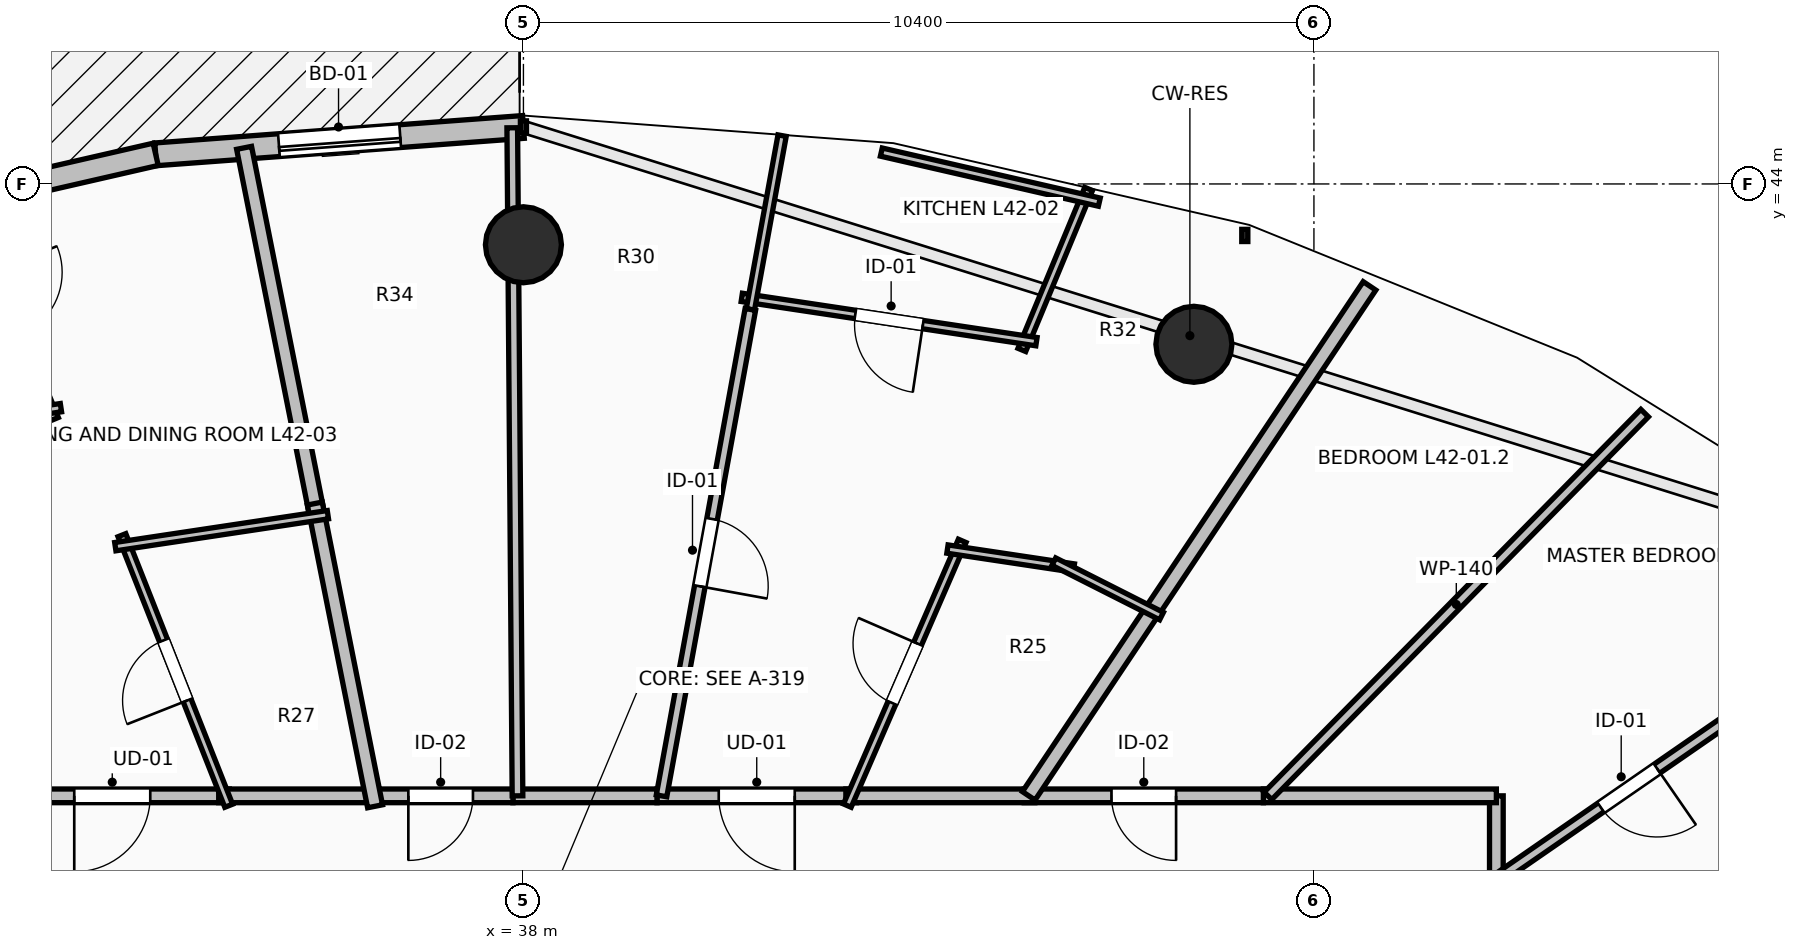
"""IFC4 building model, lengths in metres.
Left out: names, types, materials, properties, quantities, classifications, styles, units other than length and angle.
Written with IfcOpenShell. Run it as: python <this file> out.ifc"""

import sys

from ifc_helpers import new_model, si_unit, direction, frame, frame_2d, origin, origin_2d, place, context, subcontext, project, spatial, rectangle, circle, extrude, element, fill, save


model = new_model("IFC4")
c1 = context("Model", 3, precision=1e-05, world=origin(), true_north=direction((0.0, 1.0)))
c2 = subcontext(c1, "Body", "Model", "MODEL_VIEW")
j1 = project(units=[si_unit("LENGTHUNIT", "METRE"), si_unit("PLANEANGLEUNIT", "RADIAN")], contexts=[c1])
p1 = place(None, origin())
s1 = spatial("IfcSite", under=j1, at=p1, CompositionType="ELEMENT")
p2 = place(p1, origin())
s2 = spatial("IfcBuilding", under=s1, at=p2, CompositionType="ELEMENT")
p3 = place(p2, frame((0.0, 0.0, 157.1)))
s3 = spatial("IfcBuildingStorey", under=s2, at=p3, CompositionType="ELEMENT", Elevation=157.1)
for number, where, z_axis, x_axis in (
    (1, (46.821, 41.891, 0.0), (0.0, 0.0, 1.0), (0.383, 0.924, 0.0)),
    (2, (38.0, 43.2, 0.0), (0.0, 0.0, 1.0), (0.0, 1.0, 0.0)),
):
    element("IfcColumn", number, at=place(p3, frame(where, z_axis=z_axis, x_axis=x_axis)), inside=s3, PredefinedType="COLUMN", context=c2, shape_type="SweptSolid", body=[
        extrude(circle(Radius=0.5, at=origin_2d()), origin(), (0.0, 0.0, 1.0), 3.5),
    ])
p4 = place(p3, frame((38.0, 44.75, 0.0), z_axis=(0.0, 0.0, 1.0), x_axis=(-0.997237740067, -0.074275768499, 0.0)))
e3 = element("IfcWall", 3, at=p4, inside=s3, PredefinedType="STANDARD", context=c2, shape_type="SweptSolid", body=[
    extrude(rectangle(XDim=4.852, YDim=0.3, at=frame_2d((2.426, 0.0))), origin(), (0.0, 0.0, 1.0), 3.24),
])
p5 = place(p4, frame((1.626, 0.0, 0.0)))
e4 = element("IfcOpeningElement", 4, at=p5, cuts=e3, PredefinedType="OPENING", context=c2, shape_type="SweptSolid", body=[
    extrude(rectangle(XDim=1.6, YDim=2.3, at=frame_2d((0.8, 1.15))), frame((0.0, 0.165, 0.0), z_axis=(0.0, -1.0, 0.0), x_axis=(1.0, 0.0, 0.0)), (0.0, 0.0, 1.0), 0.33),
])
p6 = place(p3, frame((33.162, 44.39, 0.0), z_axis=(0.0, 0.0, 1.0), x_axis=(-0.974698897188, -0.223521944832, 0.0)))
e5 = element("IfcWall", 5, at=p6, inside=s3, PredefinedType="STANDARD", context=c2, shape_type="SweptSolid", body=[
    extrude(rectangle(XDim=4.773, YDim=0.3, at=frame_2d((2.387, 0.0))), origin(), (0.0, 0.0, 1.0), 3.24),
])
p7 = place(p3, frame((50.8, 34.92, 0.0), z_axis=(0.0, 0.0, 1.0), x_axis=(0.0, 1.0, 0.0)))
e6 = element("IfcWall", 6, at=p7, inside=s3, PredefinedType="PARTITIONING", context=c2, shape_type="SweptSolid", body=[
    extrude(rectangle(XDim=1.03, YDim=0.18, at=frame_2d((0.515, 0.0))), origin(), (0.0, 0.0, 1.0), 2.432),
])
p8 = place(p3, frame((50.8, 35.95, 0.0), z_axis=(0.0, 0.0, 1.0), x_axis=(-1.0, 0.0, 0.0)))
e7 = element("IfcWall", 7, at=p8, inside=s3, PredefinedType="PARTITIONING", context=c2, shape_type="SweptSolid", body=[
    extrude(rectangle(XDim=3.065, YDim=0.18, at=frame_2d((1.532, 0.0))), origin(), (0.0, 0.0, 1.0), 2.432),
])
p9 = place(p3, frame((47.735, 35.95, 0.0), z_axis=(0.0, 0.0, 1.0), x_axis=(-1.0, 0.0, 0.0)))
e8 = element("IfcWall", 8, at=p9, inside=s3, PredefinedType="PARTITIONING", context=c2, shape_type="SweptSolid", body=[
    extrude(rectangle(XDim=3.147, YDim=0.18, at=frame_2d((1.574, 0.0))), origin(), (0.0, 0.0, 1.0), 2.886),
])
p10 = place(p9, frame((1.148, 0.0, 0.0)))
e9 = element("IfcOpeningElement", 9, at=p10, cuts=e8, PredefinedType="OPENING", context=c2, shape_type="SweptSolid", body=[
    extrude(rectangle(XDim=0.85, YDim=2.1, at=frame_2d((0.425, 1.05))), frame((0.0, 0.105, 0.0), z_axis=(0.0, -1.0, 0.0), x_axis=(1.0, 0.0, 0.0)), (0.0, 0.0, 1.0), 0.21),
])
p11 = place(p3, frame((42.382, 35.95, 0.0), z_axis=(0.0, 0.0, 1.0), x_axis=(-1.0, 0.0, 0.0)))
e10 = element("IfcWall", 10, at=p11, inside=s3, PredefinedType="PARTITIONING", context=c2, shape_type="SweptSolid", body=[
    extrude(rectangle(XDim=2.625, YDim=0.18, at=frame_2d((1.312, 0.0))), origin(), (0.0, 0.0, 1.0), 2.886),
])
p12 = place(p11, frame((0.812, 0.0, 0.0)))
e11 = element("IfcOpeningElement", 11, at=p12, cuts=e10, PredefinedType="OPENING", context=c2, shape_type="SweptSolid", body=[
    extrude(rectangle(XDim=1.0, YDim=2.15, at=frame_2d((0.5, 1.075))), frame((0.0, 0.105, 0.0), z_axis=(0.0, -1.0, 0.0), x_axis=(1.0, 0.0, 0.0)), (0.0, 0.0, 1.0), 0.21),
])
p13 = place(p3, frame((44.728, 35.95, 0.0), z_axis=(0.0, 0.0, 1.0), x_axis=(-1.0, 0.0, 0.0)))
e12 = element("IfcWall", 12, at=p13, inside=s3, PredefinedType="PARTITIONING", context=c2, shape_type="SweptSolid", body=[
    extrude(rectangle(XDim=2.486, YDim=0.18, at=frame_2d((1.243, 0.0))), origin(), (0.0, 0.0, 1.0), 2.886),
])
p14 = place(p3, frame((39.757, 35.95, 0.0), z_axis=(0.0, 0.0, 1.0), x_axis=(-1.0, 0.0, 0.0)))
e13 = element("IfcWall", 13, at=p14, inside=s3, PredefinedType="PARTITIONING", context=c2, shape_type="SweptSolid", body=[
    extrude(rectangle(XDim=1.895, YDim=0.18, at=frame_2d((0.948, 0.0))), origin(), (0.0, 0.0, 1.0), 2.886),
])
p15 = place(p3, frame((37.862, 35.95, 0.0), z_axis=(0.0, 0.0, 1.0), x_axis=(-1.0, 0.0, 0.0)))
e14 = element("IfcWall", 14, at=p15, inside=s3, PredefinedType="PARTITIONING", context=c2, shape_type="SweptSolid", body=[
    extrude(rectangle(XDim=1.902, YDim=0.18, at=frame_2d((0.951, 0.0))), origin(), (0.0, 0.0, 1.0), 2.886),
])
p16 = place(p15, frame((0.526, 0.0, 0.0)))
e15 = element("IfcOpeningElement", 15, at=p16, cuts=e14, PredefinedType="OPENING", context=c2, shape_type="SweptSolid", body=[
    extrude(rectangle(XDim=0.85, YDim=2.1, at=frame_2d((0.425, 1.05))), frame((0.0, 0.105, 0.0), z_axis=(0.0, -1.0, 0.0), x_axis=(1.0, 0.0, 0.0)), (0.0, 0.0, 1.0), 0.21),
])
p17 = place(p3, frame((34.131, 35.95, 0.0), z_axis=(0.0, 0.0, 1.0), x_axis=(-1.0, 0.0, 0.0)))
e16 = element("IfcWall", 16, at=p17, inside=s3, PredefinedType="PARTITIONING", context=c2, shape_type="SweptSolid", body=[
    extrude(rectangle(XDim=3.081, YDim=0.18, at=frame_2d((1.541, 0.0))), origin(), (0.0, 0.0, 1.0), 2.886),
])
p18 = place(p17, frame((1.041, 0.0, 0.0)))
e17 = element("IfcOpeningElement", 17, at=p18, cuts=e16, PredefinedType="OPENING", context=c2, shape_type="SweptSolid", body=[
    extrude(rectangle(XDim=1.0, YDim=2.15, at=frame_2d((0.5, 1.075))), frame((0.0, 0.105, 0.0), z_axis=(0.0, -1.0, 0.0), x_axis=(1.0, 0.0, 0.0)), (0.0, 0.0, 1.0), 0.21),
])
p19 = place(p3, frame((36.1, 35.95, 0.0), z_axis=(0.0, 0.0, 1.0), x_axis=(-1.0, 0.0, 0.0)))
e18 = element("IfcWall", 18, at=p19, inside=s3, PredefinedType="PARTITIONING", context=c2, shape_type="SweptSolid", body=[
    extrude(rectangle(XDim=2.109, YDim=0.18, at=frame_2d((1.055, 0.0))), origin(), (0.0, 0.0, 1.0), 2.886),
])
p20 = place(p3, frame((54.29, 37.259, 0.0), z_axis=(0.0, 0.0, 1.0), x_axis=(-0.822672586971, -0.568515448027, 0.0)))
e19 = element("IfcWall", 19, at=p20, inside=s3, PredefinedType="PARTITIONING", context=c2, shape_type="SweptSolid", body=[
    extrude(rectangle(XDim=4.242, YDim=0.14, at=frame_2d((2.121, 0.0))), origin(), (0.0, 0.0, 1.0), 2.432),
])
p21 = place(p20, frame((1.671, 0.0, 0.0)))
e20 = element("IfcOpeningElement", 20, at=p21, cuts=e19, PredefinedType="OPENING", context=c2, shape_type="SweptSolid", body=[
    extrude(rectangle(XDim=0.9, YDim=2.1, at=frame_2d((0.45, 1.05))), frame((0.0, 0.085, 0.0), z_axis=(0.0, -1.0, 0.0), x_axis=(1.0, 0.0, 0.0)), (0.0, 0.0, 1.0), 0.17),
])
p22 = place(p3, frame((52.751, 40.985, 0.0), z_axis=(0.0, 0.0, 1.0), x_axis=(-0.701486551238, -0.712682691268, 0.0)))
e21 = element("IfcWall", 21, at=p22, inside=s3, PredefinedType="PARTITIONING", context=c2, shape_type="SweptSolid", body=[
    extrude(rectangle(XDim=7.065, YDim=0.14, at=frame_2d((3.533, 0.0))), origin(), (0.0, 0.0, 1.0), 2.432),
])
p23 = place(p3, frame((49.131, 42.659, 0.0), z_axis=(0.0, 0.0, 1.0), x_axis=(-0.555600584712, -0.831449331149, 0.0)))
e22 = element("IfcWall", 22, at=p23, inside=s3, PredefinedType="PARTITIONING", context=c2, shape_type="SweptSolid", body=[
    extrude(rectangle(XDim=8.069, YDim=0.2, at=frame_2d((4.035, 0.0))), origin(), (0.0, 0.0, 1.0), 2.432),
])
p24 = place(p3, frame((42.261, 35.822, 0.0), z_axis=(0.0, 0.0, 1.0), x_axis=(0.398098222937, 0.917342795739, 0.0)))
e23 = element("IfcWall", 23, at=p24, inside=s3, PredefinedType="PARTITIONING", context=c2, shape_type="SweptSolid", body=[
    extrude(rectangle(XDim=3.797, YDim=0.11, at=frame_2d((1.898, 0.0))), origin(), (0.0, 0.0, 1.0), 2.886),
])
p25 = place(p24, frame((1.473, 0.0, 0.0)))
e24 = element("IfcOpeningElement", 24, at=p25, cuts=e23, PredefinedType="OPENING", context=c2, shape_type="SweptSolid", body=[
    extrude(rectangle(XDim=0.85, YDim=2.1, at=frame_2d((0.425, 1.05))), frame((0.0, 0.07, 0.0), z_axis=(0.0, -1.0, 0.0), x_axis=(1.0, 0.0, 0.0)), (0.0, 0.0, 1.0), 0.14),
])
p26 = place(p3, frame((43.579, 39.197, 0.0), z_axis=(0.0, 0.0, 1.0), x_axis=(0.988928896576, -0.148390153032, 0.0)))
e25 = element("IfcWall", 25, at=p26, inside=s3, PredefinedType="PARTITIONING", context=c2, shape_type="SweptSolid", body=[
    extrude(rectangle(XDim=1.681, YDim=0.11, at=frame_2d((0.841, 0.0))), origin(), (0.0, 0.0, 1.0), 3.24),
])
p27 = place(p3, frame((44.978, 39.031, 0.0), z_axis=(0.0, 0.0, 1.0), x_axis=(0.892388427115, -0.451268096758, 0.0)))
e26 = element("IfcWall", 26, at=p27, inside=s3, PredefinedType="PARTITIONING", context=c2, shape_type="SweptSolid", body=[
    extrude(rectangle(XDim=1.588, YDim=0.11, at=frame_2d((0.794, 0.0))), origin(), (0.0, 0.0, 1.0), 2.972),
])
p28 = place(p3, frame((45.436, 43.934, 0.0), z_axis=(0.0, 0.0, 1.0), x_axis=(-0.383057133185, -0.923724652002, 0.0)))
e27 = element("IfcWall", 27, at=p28, inside=s3, PredefinedType="PARTITIONING", context=c2, shape_type="SweptSolid", body=[
    extrude(rectangle(XDim=2.292, YDim=0.11, at=frame_2d((1.146, 0.0))), origin(), (0.0, 0.0, 1.0), 2.728),
])
p29 = place(p3, frame((44.75, 41.925, 0.0), z_axis=(0.0, 0.0, 1.0), x_axis=(-0.988899781081, 0.148584060306, 0.0)))
e28 = element("IfcWall", 28, at=p29, inside=s3, PredefinedType="PARTITIONING", context=c2, shape_type="SweptSolid", body=[
    extrude(rectangle(XDim=3.92, YDim=0.11, at=frame_2d((1.96, 0.0))), origin(), (0.0, 0.0, 1.0), 3.24),
])
p30 = place(p29, frame((1.51, 0.0, 0.0)))
e29 = element("IfcOpeningElement", 29, at=p30, cuts=e28, PredefinedType="OPENING", context=c2, shape_type="SweptSolid", body=[
    extrude(rectangle(XDim=0.9, YDim=2.1, at=frame_2d((0.45, 1.05))), frame((0.0, 0.07, 0.0), z_axis=(0.0, -1.0, 0.0), x_axis=(1.0, 0.0, 0.0)), (0.0, 0.0, 1.0), 0.14),
])
p31 = place(p3, frame((40.986, 42.349, 0.0), z_axis=(0.0, 0.0, 1.0), x_axis=(0.179523238587, 0.983753732805, 0.0)))
e30 = element("IfcWall", 30, at=p31, inside=s3, PredefinedType="PARTITIONING", context=c2, shape_type="SweptSolid", body=[
    extrude(rectangle(XDim=2.324, YDim=0.11, at=frame_2d((1.162, 0.0))), origin(), (0.0, 0.0, 1.0), 2.728),
])
p32 = place(p3, frame((45.576, 43.761, 0.0), z_axis=(0.0, 0.0, 1.0), x_axis=(-0.974642290338, 0.223768643657, 0.0)))
e31 = element("IfcWall", 31, at=p32, inside=s3, PredefinedType="PARTITIONING", context=c2, shape_type="SweptSolid", body=[
    extrude(rectangle(XDim=2.943, YDim=0.11, at=frame_2d((1.471, 0.0))), origin(), (0.0, 0.0, 1.0), 3.24),
])
p33 = place(p3, frame((40.986, 42.349, 0.0), z_axis=(0.0, 0.0, 1.0), x_axis=(-0.179654893395, -0.983729698281, 0.0)))
e32 = element("IfcWall", 32, at=p33, inside=s3, PredefinedType="PARTITIONING", context=c2, shape_type="SweptSolid", body=[
    extrude(rectangle(XDim=6.505, YDim=0.14, at=frame_2d((3.253, 0.0))), origin(), (0.0, 0.0, 1.0), 2.886),
])
p34 = place(p33, frame((2.802, 0.0, 0.0)))
e33 = element("IfcOpeningElement", 33, at=p34, cuts=e32, PredefinedType="OPENING", context=c2, shape_type="SweptSolid", body=[
    extrude(rectangle(XDim=0.9, YDim=2.1, at=frame_2d((0.45, 1.05))), frame((0.0, 0.085, 0.0), z_axis=(0.0, -1.0, 0.0), x_axis=(1.0, 0.0, 0.0)), (0.0, 0.0, 1.0), 0.17),
])
p35 = place(p3, frame((37.853, 44.739, 0.0), z_axis=(0.0, 0.0, 1.0), x_axis=(0.007860868226, -0.999969102898, 0.0)))
e34 = element("IfcWall", 34, at=p35, inside=s3, PredefinedType="PARTITIONING", context=c2, shape_type="SweptSolid", body=[
    extrude(rectangle(XDim=8.789, YDim=0.14, at=frame_2d((4.395, 0.0))), origin(), (0.0, 0.0, 1.0), 2.432),
])
p36 = place(p3, frame((34.325, 44.475, 0.0), z_axis=(0.0, 0.0, 1.0), x_axis=(0.195054941626, -0.980792317337, 0.0)))
e35 = element("IfcWall", 35, at=p36, inside=s3, PredefinedType="PARTITIONING", context=c2, shape_type="SweptSolid", body=[
    extrude(rectangle(XDim=4.911, YDim=0.2, at=frame_2d((2.456, 0.0))), origin(), (0.0, 0.0, 1.0), 2.432),
])
p37 = place(p3, frame((35.256, 39.795, 0.0), z_axis=(0.0, 0.0, 1.0), x_axis=(0.195214230991, -0.980760625239, 0.0)))
e36 = element("IfcWall", 36, at=p37, inside=s3, PredefinedType="PARTITIONING", context=c2, shape_type="SweptSolid", body=[
    extrude(rectangle(XDim=4.061, YDim=0.2, at=frame_2d((2.03, 0.0))), origin(), (0.0, 0.0, 1.0), 2.886),
])
p38 = place(p3, frame((34.122, 35.82, 0.0), z_axis=(0.0, 0.0, 1.0), x_axis=(-0.36711859649, 0.930174142896, 0.0)))
e37 = element("IfcWall", 37, at=p38, inside=s3, PredefinedType="PARTITIONING", context=c2, shape_type="SweptSolid", body=[
    extrude(rectangle(XDim=3.826, YDim=0.11, at=frame_2d((1.913, 0.0))), origin(), (0.0, 0.0, 1.0), 2.432),
])
p39 = place(p38, frame((1.488, 0.0, 0.0)))
e38 = element("IfcOpeningElement", 38, at=p39, cuts=e37, PredefinedType="OPENING", context=c2, shape_type="SweptSolid", body=[
    extrude(rectangle(XDim=0.85, YDim=2.1, at=frame_2d((0.425, 1.05))), frame((0.0, 0.07, 0.0), z_axis=(0.0, -1.0, 0.0), x_axis=(1.0, 0.0, 0.0)), (0.0, 0.0, 1.0), 0.14),
])
p40 = place(p3, frame((32.631, 39.228, 0.0), z_axis=(0.0, 0.0, 1.0), x_axis=(0.988890718673, 0.148644362566, 0.0)))
e39 = element("IfcWall", 39, at=p40, inside=s3, PredefinedType="PARTITIONING", context=c2, shape_type="SweptSolid", body=[
    extrude(rectangle(XDim=2.828, YDim=0.11, at=frame_2d((1.414, 0.0))), origin(), (0.0, 0.0, 1.0), 2.432),
])
p41 = place(p3, frame((30.576, 43.938, 0.0), z_axis=(0.0, 0.0, 1.0), x_axis=(0.382336453712, -0.924023179451, 0.0)))
e40 = element("IfcWall", 40, at=p41, inside=s3, PredefinedType="PARTITIONING", context=c2, shape_type="SweptSolid", body=[
    extrude(rectangle(XDim=3.28, YDim=0.11, at=frame_2d((1.64, 0.0))), origin(), (0.0, 0.0, 1.0), 2.728),
])
p42 = place(p41, frame((1.19, 0.0, 0.0)))
e41 = element("IfcOpeningElement", 41, at=p42, cuts=e40, PredefinedType="OPENING", context=c2, shape_type="SweptSolid", body=[
    extrude(rectangle(XDim=0.9, YDim=2.1, at=frame_2d((0.45, 1.05))), frame((0.0, 0.07, 0.0), z_axis=(0.0, -1.0, 0.0), x_axis=(1.0, 0.0, 0.0)), (0.0, 0.0, 1.0), 0.14),
])
p43 = place(p3, frame((31.915, 41.057, 0.0), z_axis=(0.0, 0.0, 1.0), x_axis=(-0.98883996758, -0.148981604626, 0.0)))
e42 = element("IfcWall", 42, at=p43, inside=s3, PredefinedType="PARTITIONING", context=c2, shape_type="SweptSolid", body=[
    extrude(rectangle(XDim=2.16, YDim=0.11, at=frame_2d((1.08, 0.0))), origin(), (0.0, 0.0, 1.0), 3.24),
])
p44 = place(p5, origin())
e43 = element("IfcDoor", 43, at=p44, inside=s3, OperationType="SLIDING_TO_LEFT", PredefinedType="DOOR", context=c2, shape_type="SweptSolid", body=[
    extrude(rectangle(XDim=1.6, YDim=2.3, at=frame_2d((0.8, 1.15))), frame((0.0, 0.025, 0.0), z_axis=(0.0, -1.0, 0.0), x_axis=(1.0, 0.0, 0.0)), (0.0, 0.0, 1.0), 0.05),
])
fill(e4, e43)
p45 = place(p12, origin())
e44 = element("IfcDoor", 44, at=p45, inside=s3, OperationType="SINGLE_SWING_LEFT", PredefinedType="DOOR", context=c2, shape_type="SweptSolid", body=[
    extrude(rectangle(XDim=1.0, YDim=2.15, at=frame_2d((0.5, 1.075))), frame((0.0, 0.025, 0.0), z_axis=(0.0, -1.0, 0.0), x_axis=(1.0, 0.0, 0.0)), (0.0, 0.0, 1.0), 0.05),
])
fill(e11, e44)
p46 = place(p18, origin())
e45 = element("IfcDoor", 45, at=p46, inside=s3, OperationType="SINGLE_SWING_RIGHT", PredefinedType="DOOR", context=c2, shape_type="SweptSolid", body=[
    extrude(rectangle(XDim=1.0, YDim=2.15, at=frame_2d((0.5, 1.075))), frame((0.0, 0.025, 0.0), z_axis=(0.0, -1.0, 0.0), x_axis=(1.0, 0.0, 0.0)), (0.0, 0.0, 1.0), 0.05),
])
fill(e17, e45)
p47 = place(p21, origin())
e46 = element("IfcDoor", 46, at=p47, inside=s3, OperationType="SINGLE_SWING_LEFT", PredefinedType="DOOR", context=c2, shape_type="SweptSolid", body=[
    extrude(rectangle(XDim=0.9, YDim=2.1, at=frame_2d((0.45, 1.05))), frame((0.0, 0.025, 0.0), z_axis=(0.0, -1.0, 0.0), x_axis=(1.0, 0.0, 0.0)), (0.0, 0.0, 1.0), 0.05),
])
fill(e20, e46)
p48 = place(p25, origin())
e47 = element("IfcDoor", 47, at=p48, inside=s3, OperationType="SINGLE_SWING_RIGHT", PredefinedType="DOOR", context=c2, shape_type="SweptSolid", body=[
    extrude(rectangle(XDim=0.85, YDim=2.1, at=frame_2d((0.425, 1.05))), frame((0.0, 0.025, 0.0), z_axis=(0.0, -1.0, 0.0), x_axis=(1.0, 0.0, 0.0)), (0.0, 0.0, 1.0), 0.05),
])
fill(e24, e47)
p49 = place(p30, origin())
e48 = element("IfcDoor", 48, at=p49, inside=s3, OperationType="SINGLE_SWING_LEFT", PredefinedType="DOOR", context=c2, shape_type="SweptSolid", body=[
    extrude(rectangle(XDim=0.9, YDim=2.1, at=frame_2d((0.45, 1.05))), frame((0.0, 0.025, 0.0), z_axis=(0.0, -1.0, 0.0), x_axis=(1.0, 0.0, 0.0)), (0.0, 0.0, 1.0), 0.05),
])
fill(e29, e48)
p50 = place(p34, origin())
e49 = element("IfcDoor", 49, at=p50, inside=s3, OperationType="SINGLE_SWING_RIGHT", PredefinedType="DOOR", context=c2, shape_type="SweptSolid", body=[
    extrude(rectangle(XDim=0.9, YDim=2.1, at=frame_2d((0.45, 1.05))), frame((0.0, 0.025, 0.0), z_axis=(0.0, -1.0, 0.0), x_axis=(1.0, 0.0, 0.0)), (0.0, 0.0, 1.0), 0.05),
])
fill(e33, e49)
p51 = place(p39, origin())
e50 = element("IfcDoor", 50, at=p51, inside=s3, OperationType="SINGLE_SWING_LEFT", PredefinedType="DOOR", context=c2, shape_type="SweptSolid", body=[
    extrude(rectangle(XDim=0.85, YDim=2.1, at=frame_2d((0.425, 1.05))), frame((0.0, 0.025, 0.0), z_axis=(0.0, -1.0, 0.0), x_axis=(1.0, 0.0, 0.0)), (0.0, 0.0, 1.0), 0.05),
])
fill(e38, e50)
p52 = place(p10, origin())
e51 = element("IfcDoor", 51, at=p52, inside=s3, OperationType="SINGLE_SWING_LEFT", PredefinedType="DOOR", context=c2, shape_type="SweptSolid", body=[
    extrude(rectangle(XDim=0.85, YDim=2.1, at=frame_2d((0.425, 1.05))), frame((0.0, 0.025, 0.0), z_axis=(0.0, -1.0, 0.0), x_axis=(1.0, 0.0, 0.0)), (0.0, 0.0, 1.0), 0.05),
])
fill(e9, e51)
p53 = place(p16, origin())
e52 = element("IfcDoor", 52, at=p53, inside=s3, OperationType="SINGLE_SWING_RIGHT", PredefinedType="DOOR", context=c2, shape_type="SweptSolid", body=[
    extrude(rectangle(XDim=0.85, YDim=2.1, at=frame_2d((0.425, 1.05))), frame((0.0, 0.025, 0.0), z_axis=(0.0, -1.0, 0.0), x_axis=(1.0, 0.0, 0.0)), (0.0, 0.0, 1.0), 0.05),
])
fill(e15, e52)
save(model, sys.argv[1])
